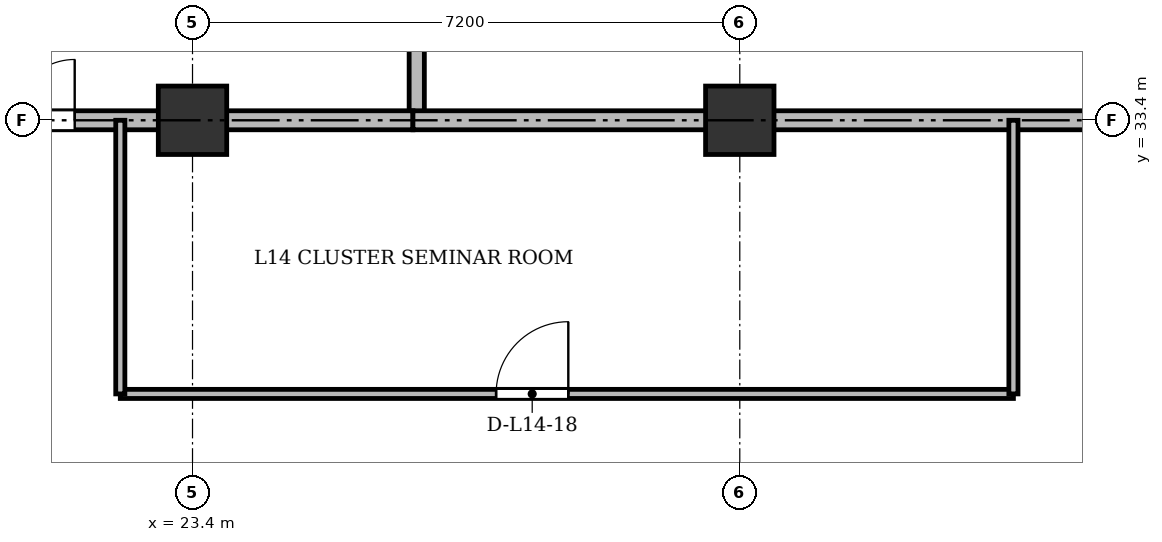
"""IFC4 building model, lengths in metres.
Left out: names, types, materials, properties, quantities, classifications, styles, units other than length and angle.
Written with IfcOpenShell. Run it as: python <this file> out.ifc"""

import sys

from ifc_helpers import new_model, si_unit, direction, frame, frame_2d, origin, origin_2d, place, context, subcontext, project, spatial, rectangle, extrude, source, transform, mapped, element, fill, save


model = new_model("IFC4")
c1 = context("Model", 3, precision=1e-05, world=origin(), true_north=direction((0.0, 1.0)))
c2 = subcontext(c1, "Body", "Model", "MODEL_VIEW")
j1 = project(units=[si_unit("LENGTHUNIT", "METRE"), si_unit("PLANEANGLEUNIT", "RADIAN")], contexts=[c1])
p1 = place(None, origin())
s1 = spatial("IfcSite", under=j1, at=p1, CompositionType="ELEMENT")
p2 = place(p1, origin())
s2 = spatial("IfcBuilding", under=s1, at=p2, CompositionType="ELEMENT")
p3 = place(p2, frame((0.0, 0.0, 55.9)))
s3 = spatial("IfcBuildingStorey", under=s2, at=p3, CompositionType="ELEMENT", Elevation=55.9)
m1 = source(origin(), c2, "Body", "SweptSolid", [
    extrude(rectangle(XDim=0.9, YDim=0.9, at=origin_2d()), origin(), (0.0, 0.0, 1.0), 3.6),
])
for number, where, z_axis, x_axis in (
    (1, (23.4, 33.4, 0.0), (0.0, 0.0, 1.0), (1.0, 0.0, 0.0)),
    (2, (30.6, 33.4, 0.0), (0.0, 0.0, 1.0), (1.0, 0.0, 0.0)),
):
    element("IfcColumn", number, at=place(p3, frame(where, z_axis=z_axis, x_axis=x_axis)), inside=s3, PredefinedType="COLUMN", context=c2, shape_type="MappedRepresentation", body=[
        mapped(m1, transform((0.0, 0.0, 0.0), x_axis=(1.0, 0.0, 0.0), y_axis=(0.0, 1.0, 0.0), z_axis=(0.0, 0.0, 1.0), scale=1.0)),
    ])
p4 = place(p3, frame((26.35, 33.4, 0.0), z_axis=(0.0, 0.0, 1.0), x_axis=(0.0, 1.0, 0.0)))
e3 = element("IfcWall", 3, at=p4, inside=s3, PredefinedType="SOLIDWALL", context=c2, shape_type="SweptSolid", body=[
    extrude(rectangle(XDim=11.3, YDim=0.2, at=frame_2d((5.65, 0.0))), origin(), (0.0, 0.0, 1.0), 2.69),
])
p5 = place(p3, frame((19.5, 33.4, 0.0), z_axis=(0.0, 0.0, 1.0), x_axis=(1.0, 0.0, 0.0)))
e4 = element("IfcWall", 4, at=p5, inside=s3, PredefinedType="PARTITIONING", context=c2, shape_type="SweptSolid", body=[
    extrude(rectangle(XDim=6.8, YDim=0.25, at=frame_2d((3.4, 0.0))), origin(), (0.0, 0.0, 1.0), 2.69),
])
p6 = place(p5, frame((0.75, 0.0, 0.0)))
e5 = element("IfcOpeningElement", 5, at=p6, cuts=e4, PredefinedType="OPENING", context=c2, shape_type="SweptSolid", body=[
    extrude(rectangle(XDim=1.6, YDim=2.2, at=frame_2d((0.8, 1.1))), frame((0.0, 0.135, 0.0), z_axis=(0.0, -1.0, 0.0), x_axis=(1.0, 0.0, 0.0)), (0.0, 0.0, 1.0), 0.27),
])
p7 = place(p3, frame((26.3, 33.4, 0.0), z_axis=(0.0, 0.0, 1.0), x_axis=(1.0, 0.0, 0.0)))
e6 = element("IfcWall", 6, at=p7, inside=s3, PredefinedType="PARTITIONING", context=c2, shape_type="SweptSolid", body=[
    extrude(rectangle(XDim=20.85, YDim=0.25, at=frame_2d((10.425, 0.0))), origin(), (0.0, 0.0, 1.0), 2.69),
])
p8 = place(p7, frame((9.2, 0.0, 0.0)))
e7 = element("IfcOpeningElement", 7, at=p8, cuts=e6, PredefinedType="OPENING", context=c2, shape_type="SweptSolid", body=[
    extrude(rectangle(XDim=1.6, YDim=2.2, at=frame_2d((0.8, 1.1))), frame((0.0, 0.135, 0.0), z_axis=(0.0, -1.0, 0.0), x_axis=(1.0, 0.0, 0.0)), (0.0, 0.0, 1.0), 0.27),
])
p9 = place(p3, frame((22.45, 29.8, 0.0), z_axis=(0.0, 0.0, 1.0), x_axis=(1.0, 0.0, 0.0)))
e8 = element("IfcWall", 8, at=p9, inside=s3, PredefinedType="PARTITIONING", context=c2, shape_type="SweptSolid", body=[
    extrude(rectangle(XDim=11.75, YDim=0.12, at=frame_2d((5.875, 0.0))), origin(), (0.0, 0.0, 1.0), 2.752),
])
p10 = place(p9, frame((4.944, 0.0, 0.0)))
e9 = element("IfcOpeningElement", 9, at=p10, cuts=e8, PredefinedType="OPENING", context=c2, shape_type="SweptSolid", body=[
    extrude(rectangle(XDim=0.95, YDim=2.15, at=frame_2d((0.475, 1.075))), frame((0.0, 0.07, 0.0), z_axis=(0.0, -1.0, 0.0), x_axis=(1.0, 0.0, 0.0)), (0.0, 0.0, 1.0), 0.14),
])
for number, where, z_axis, x_axis in (
    (10, (22.45, 29.8, 0.0), (0.0, 0.0, 1.0), (0.0, 1.0, 0.0)),
    (11, (34.2, 29.8, 0.0), (0.0, 0.0, 1.0), (0.0, 1.0, 0.0)),
):
    element("IfcWall", number, at=place(p3, frame(where, z_axis=z_axis, x_axis=x_axis)), inside=s3, PredefinedType="PARTITIONING", context=c2, shape_type="SweptSolid", body=[
        extrude(rectangle(XDim=3.6, YDim=0.12, at=frame_2d((1.8, 0.0))), origin(), (0.0, 0.0, 1.0), 2.69),
    ])
m2 = source(origin(), c2, "Body", "SweptSolid", [
    extrude(rectangle(XDim=1.6, YDim=2.2, at=frame_2d((0.8, 1.1))), frame((0.0, 0.025, 0.0), z_axis=(0.0, -1.0, 0.0), x_axis=(1.0, 0.0, 0.0)), (0.0, 0.0, 1.0), 0.05),
])
p11 = place(p6, origin())
e12 = element("IfcDoor", 12, at=p11, inside=s3, OperationType="DOUBLE_DOOR_SINGLE_SWING", PredefinedType="DOOR", context=c2, shape_type="MappedRepresentation", body=[
    mapped(m2, transform((0.0, 0.0, 0.0), x_axis=(1.0, 0.0, 0.0), y_axis=(0.0, 1.0, 0.0), z_axis=(0.0, 0.0, 1.0), scale=1.0)),
])
fill(e5, e12)
m3 = source(origin(), c2, "Body", "SweptSolid", [
    extrude(rectangle(XDim=0.95, YDim=2.15, at=frame_2d((0.475, 1.075))), frame((0.0, 0.025, 0.0), z_axis=(0.0, -1.0, 0.0), x_axis=(1.0, 0.0, 0.0)), (0.0, 0.0, 1.0), 0.05),
])
p12 = place(p10, origin())
e13 = element("IfcDoor", 13, at=p12, inside=s3, OperationType="SINGLE_SWING_RIGHT", PredefinedType="DOOR", context=c2, shape_type="MappedRepresentation", body=[
    mapped(m3, transform((0.0, 0.0, 0.0), x_axis=(1.0, 0.0, 0.0), y_axis=(0.0, 1.0, 0.0), z_axis=(0.0, 0.0, 1.0), scale=1.0)),
])
fill(e9, e13)
save(model, sys.argv[1])
